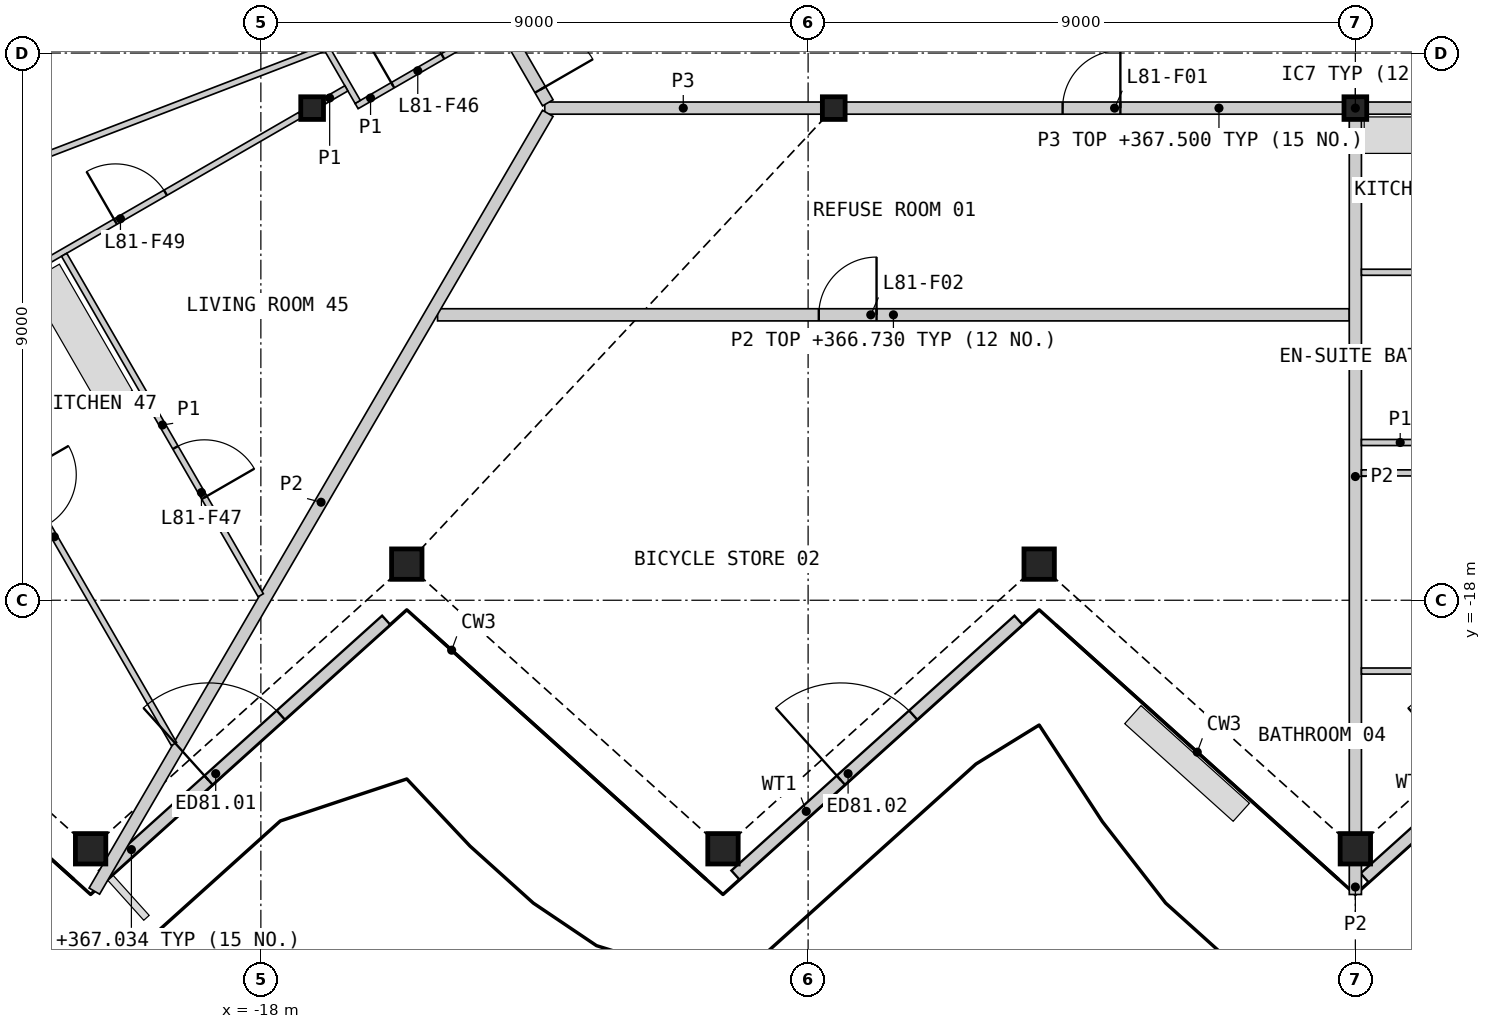
"""IFC4 building model, lengths in metres.
Left out: names, types, materials, properties, quantities, classifications, styles, units other than length and angle.
Written with IfcOpenShell. Run it as: python <this file> out.ifc"""

import sys

from ifc_helpers import new_model, si_unit, direction, frame, frame_2d, origin, origin_2d, place, context, subcontext, project, spatial, rectangle, hollow_rectangle, i_section, extrude, element, fill, save


model = new_model("IFC4")
c1 = context("Model", 3, precision=1e-05, world=origin(), true_north=direction((0.0, 1.0)))
c2 = subcontext(c1, "Body", "Model", "MODEL_VIEW")
j1 = project(units=[si_unit("LENGTHUNIT", "METRE"), si_unit("PLANEANGLEUNIT", "RADIAN")], contexts=[c1])
p1 = place(None, origin())
s1 = spatial("IfcSite", under=j1, at=p1, CompositionType="ELEMENT")
p2 = place(p1, origin())
s2 = spatial("IfcBuilding", under=s1, at=p2, CompositionType="ELEMENT")
p3 = place(p2, frame((0.0, 0.0, 364.4)))
s3 = spatial("IfcBuildingStorey", under=s2, at=p3, CompositionType="ELEMENT", Elevation=364.4)
for number, where, z_axis, x_axis in (
    (1, (-20.8, -22.088, 0.0), (0.0, 0.0, 1.0), (1.0, 0.0, 0.0)),
    (2, (-15.6, -17.406, 0.0), (0.0, 0.0, 1.0), (1.0, 0.0, 0.0)),
    (3, (-10.4, -22.088, 0.0), (0.0, 0.0, 1.0), (1.0, 0.0, 0.0)),
    (4, (-5.2, -17.406, 0.0), (0.0, 0.0, 1.0), (1.0, 0.0, 0.0)),
    (5, (0.0, -22.088, 0.0), (0.0, 0.0, 1.0), (1.0, 0.0, 0.0)),
):
    element("IfcColumn", number, at=place(p3, frame(where, z_axis=z_axis, x_axis=x_axis)), inside=s3, PredefinedType="COLUMN", context=c2, shape_type="SweptSolid", body=[
        extrude(hollow_rectangle(XDim=0.5, YDim=0.5, WallThickness=0.03, at=origin_2d()), origin(), (0.0, 0.0, 1.0), 3.4),
    ])
for number, where, z_axis, x_axis in (
    (6, (-17.157, -9.906, 0.0), (0.0, 0.0, 1.0), (1.0, 0.0, 0.0)),
    (7, (-8.578, -9.906, 0.0), (0.0, 0.0, 1.0), (1.0, 0.0, 0.0)),
    (8, (0.0, -9.906, 0.0), (0.0, 0.0, 1.0), (1.0, 0.0, 0.0)),
):
    element("IfcColumn", number, at=place(p3, frame(where, z_axis=z_axis, x_axis=x_axis)), inside=s3, PredefinedType="COLUMN", context=c2, shape_type="SweptSolid", body=[
        extrude(i_section(OverallWidth=0.374, OverallDepth=0.372, WebThickness=0.016, FlangeThickness=0.026, at=origin_2d()), origin(), (0.0, 0.0, 1.0), 3.4),
    ])
p4 = place(p3, frame((-20.595, -22.52, 0.0), z_axis=(0.0, 0.0, 1.0), x_axis=(0.743137181878, 0.669139095339, 0.0)))
e9 = element("IfcWall", 9, at=p4, inside=s3, PredefinedType="SOLIDWALL", context=c2, shape_type="SweptSolid", body=[
    extrude(rectangle(XDim=6.265, YDim=0.2, at=frame_2d((3.133, 0.0))), origin(), (0.0, 0.0, 1.0), 2.634),
])
p5 = place(p4, frame((2.333, 0.0, 0.0)))
e10 = element("IfcOpeningElement", 10, at=p5, cuts=e9, PredefinedType="OPENING", context=c2, shape_type="SweptSolid", body=[
    extrude(rectangle(XDim=1.6, YDim=2.25, at=frame_2d((0.8, 1.125))), frame((0.0, 0.11, 0.0), z_axis=(0.0, -1.0, 0.0), x_axis=(1.0, 0.0, 0.0)), (0.0, 0.0, 1.0), 0.22),
])
p6 = place(p3, frame((-10.195, -22.52, 0.0), z_axis=(0.0, 0.0, 1.0), x_axis=(0.743137181878, 0.669139095339, 0.0)))
e11 = element("IfcWall", 11, at=p6, inside=s3, PredefinedType="SOLIDWALL", context=c2, shape_type="SweptSolid", body=[
    extrude(rectangle(XDim=6.265, YDim=0.2, at=frame_2d((3.133, 0.0))), origin(), (0.0, 0.0, 1.0), 2.634),
])
p7 = place(p6, frame((2.333, 0.0, 0.0)))
e12 = element("IfcOpeningElement", 12, at=p7, cuts=e11, PredefinedType="OPENING", context=c2, shape_type="SweptSolid", body=[
    extrude(rectangle(XDim=1.6, YDim=2.25, at=frame_2d((0.8, 1.125))), frame((0.0, 0.11, 0.0), z_axis=(0.0, -1.0, 0.0), x_axis=(1.0, 0.0, 0.0)), (0.0, 0.0, 1.0), 0.22),
])
p8 = place(p3, frame((0.154, -22.567, 0.0), z_axis=(0.0, 0.0, 1.0), x_axis=(0.743150529995, 0.669124270796, 0.0)))
e13 = element("IfcWall", 13, at=p8, inside=s3, PredefinedType="SOLIDWALL", context=c2, shape_type="SweptSolid", body=[
    extrude(rectangle(XDim=6.678, YDim=0.2, at=frame_2d((3.339, 0.0))), origin(), (0.0, 0.0, 1.0), 2.634),
])
p9 = place(p8, frame((2.402, 0.0, 0.0)))
e14 = element("IfcOpeningElement", 14, at=p9, cuts=e13, PredefinedType="OPENING", context=c2, shape_type="SweptSolid", body=[
    extrude(rectangle(XDim=1.6, YDim=2.25, at=frame_2d((0.8, 1.125))), frame((0.0, 0.11, 0.0), z_axis=(0.0, -1.0, 0.0), x_axis=(1.0, 0.0, 0.0)), (0.0, 0.0, 1.0), 0.22),
])
p10 = place(p3, frame((-8.382, -9.906, 0.0), z_axis=(0.0, 0.0, 1.0), x_axis=(1.0, 0.0, 0.0)))
e15 = element("IfcWall", 15, at=p10, inside=s3, PredefinedType="PARTITIONING", context=c2, shape_type="SweptSolid", body=[
    extrude(rectangle(XDim=8.185, YDim=0.2, at=frame_2d((4.092, 0.0))), origin(), (0.0, 0.0, 1.0), 3.1),
])
p11 = place(p10, frame((3.567, 0.0, 0.0)))
e16 = element("IfcOpeningElement", 16, at=p11, cuts=e15, PredefinedType="OPENING", context=c2, shape_type="SweptSolid", body=[
    extrude(rectangle(XDim=0.95, YDim=2.1, at=frame_2d((0.475, 1.05))), frame((0.0, 0.11, 0.0), z_axis=(0.0, -1.0, 0.0), x_axis=(1.0, 0.0, 0.0)), (0.0, 0.0, 1.0), 0.22),
])
p12 = place(p3, frame((0.197, -9.906, 0.0), z_axis=(0.0, 0.0, 1.0), x_axis=(1.0, 0.0, 0.0)))
e17 = element("IfcWall", 17, at=p12, inside=s3, PredefinedType="PARTITIONING", context=c2, shape_type="SweptSolid", body=[
    extrude(rectangle(XDim=8.185, YDim=0.2, at=frame_2d((4.092, 0.0))), origin(), (0.0, 0.0, 1.0), 3.1),
])
p13 = place(p12, frame((3.39, 0.0, 0.0)))
e18 = element("IfcOpeningElement", 18, at=p13, cuts=e17, PredefinedType="OPENING", context=c2, shape_type="SweptSolid", body=[
    extrude(rectangle(XDim=1.0, YDim=2.1, at=frame_2d((0.5, 1.05))), frame((0.0, 0.11, 0.0), z_axis=(0.0, -1.0, 0.0), x_axis=(1.0, 0.0, 0.0)), (0.0, 0.0, 1.0), 0.22),
])
p14 = place(p3, frame((-13.331, -9.906, 0.0), z_axis=(0.0, 0.0, 1.0), x_axis=(1.0, 0.0, 0.0)))
e19 = element("IfcWall", 19, at=p14, inside=s3, PredefinedType="PARTITIONING", context=c2, shape_type="SweptSolid", body=[
    extrude(rectangle(XDim=4.555, YDim=0.2, at=frame_2d((2.278, 0.0))), origin(), (0.0, 0.0, 1.0), 3.1),
])
p15 = place(p3, frame((-15.131, -6.614, 0.0), z_axis=(0.0, 0.0, 1.0), x_axis=(0.499948957823, -0.866054870994, 0.0)))
e20 = element("IfcWall", 20, at=p15, inside=s3, PredefinedType="PARTITIONING", context=c2, shape_type="SweptSolid", body=[
    extrude(rectangle(XDim=3.701, YDim=0.2, at=frame_2d((1.851, 0.0))), origin(), (0.0, 0.0, 1.0), 3.1),
])
p16 = place(p15, frame((2.451, 0.0, 0.0)))
e21 = element("IfcOpeningElement", 21, at=p16, cuts=e20, PredefinedType="OPENING", context=c2, shape_type="SweptSolid", body=[
    extrude(rectangle(XDim=1.0, YDim=2.1, at=frame_2d((0.5, 1.05))), frame((0.0, 0.11, 0.0), z_axis=(0.0, -1.0, 0.0), x_axis=(1.0, 0.0, 0.0)), (0.0, 0.0, 1.0), 0.22),
])
p17 = place(p3, frame((-15.094, -13.306, 0.0), z_axis=(0.0, 0.0, 1.0), x_axis=(1.0, 0.0, 0.0)))
e22 = element("IfcWall", 22, at=p17, inside=s3, PredefinedType="PARTITIONING", context=c2, shape_type="SweptSolid", body=[
    extrude(rectangle(XDim=14.994, YDim=0.2, at=frame_2d((7.497, 0.0))), origin(), (0.0, 0.0, 1.0), 2.33),
])
p18 = place(p17, frame((6.27, 0.0, 0.0)))
e23 = element("IfcOpeningElement", 23, at=p18, cuts=e22, PredefinedType="OPENING", context=c2, shape_type="SweptSolid", body=[
    extrude(rectangle(XDim=0.95, YDim=2.1, at=frame_2d((0.475, 1.05))), frame((0.0, 0.11, 0.0), z_axis=(0.0, -1.0, 0.0), x_axis=(1.0, 0.0, 0.0)), (0.0, 0.0, 1.0), 0.22),
])
p19 = place(p3, frame((-20.739, -22.784, 0.0), z_axis=(0.0, 0.0, 1.0), x_axis=(0.50362599185, 0.863921790635, 0.0)))
e24 = element("IfcWall", 24, at=p19, inside=s3, PredefinedType="PARTITIONING", context=c2, shape_type="SweptSolid", body=[
    extrude(rectangle(XDim=14.807, YDim=0.2, at=frame_2d((7.404, 0.0))), origin(), (0.0, 0.0, 1.0), 2.33),
])
p20 = place(p3, frame((0.0, -21.828, 0.0), z_axis=(0.0, 0.0, 1.0), x_axis=(0.0, 1.0, 0.0)))
e25 = element("IfcWall", 25, at=p20, inside=s3, PredefinedType="PARTITIONING", context=c2, shape_type="SweptSolid", body=[
    extrude(rectangle(XDim=11.725, YDim=0.2, at=frame_2d((5.863, 0.0))), origin(), (0.0, 0.0, 1.0), 2.33),
])
p21 = place(p3, frame((0.0, -22.839, 0.0), z_axis=(0.0, 0.0, 1.0), x_axis=(0.0, 1.0, 0.0)))
e26 = element("IfcWall", 26, at=p21, inside=s3, PredefinedType="PARTITIONING", context=c2, shape_type="SweptSolid", body=[
    extrude(rectangle(XDim=0.491, YDim=0.2, at=frame_2d((0.246, 0.0))), origin(), (0.0, 0.0, 1.0), 2.33),
])
p22 = place(p3, frame((-28.725, -13.438, 0.0), z_axis=(0.0, 0.0, 1.0), x_axis=(0.933580312145, 0.358368247444, 0.0)))
e27 = element("IfcWall", 27, at=p22, inside=s3, PredefinedType="PARTITIONING", context=c2, shape_type="SweptSolid", body=[
    extrude(rectangle(XDim=12.59, YDim=0.1, at=frame_2d((6.295, 0.0))), origin(), (0.0, 0.0, 1.0), 2.33),
])
p23 = place(p22, frame((6.171, 0.0, 0.0)))
e28 = element("IfcOpeningElement", 28, at=p23, cuts=e27, PredefinedType="OPENING", context=c2, shape_type="SweptSolid", body=[
    extrude(rectangle(XDim=0.95, YDim=2.1, at=frame_2d((0.475, 1.05))), frame((0.0, 0.06, 0.0), z_axis=(0.0, -1.0, 0.0), x_axis=(1.0, 0.0, 0.0)), (0.0, 0.0, 1.0), 0.12),
])
p24 = place(p3, frame((-26.777, -15.46, 0.0), z_axis=(0.0, 0.0, 1.0), x_axis=(0.866019680922, 0.500009912158, 0.0)))
e29 = element("IfcWall", 29, at=p24, inside=s3, PredefinedType="PARTITIONING", context=c2, shape_type="SweptSolid", body=[
    extrude(rectangle(XDim=10.881, YDim=0.1, at=frame_2d((5.44, 0.0))), origin(), (0.0, 0.0, 1.0), 2.33),
])
p25 = place(p24, frame((7.373, 0.0, 0.0)))
e30 = element("IfcOpeningElement", 30, at=p25, cuts=e29, PredefinedType="OPENING", context=c2, shape_type="SweptSolid", body=[
    extrude(rectangle(XDim=0.95, YDim=2.1, at=frame_2d((0.475, 1.05))), frame((0.0, 0.06, 0.0), z_axis=(0.0, -1.0, 0.0), x_axis=(1.0, 0.0, 0.0)), (0.0, 0.0, 1.0), 0.12),
])
p26 = place(p3, frame((-23.365, -13.548, 0.0), z_axis=(0.0, 0.0, 1.0), x_axis=(0.500011483804, -0.866018773506, 0.0)))
e31 = element("IfcWall", 31, at=p26, inside=s3, PredefinedType="PARTITIONING", context=c2, shape_type="SweptSolid", body=[
    extrude(rectangle(XDim=7.872, YDim=0.1, at=frame_2d((3.936, 0.0))), origin(), (0.0, 0.0, 1.0), 2.33),
])
p27 = place(p26, frame((2.759, 0.0, 0.0)))
e32 = element("IfcOpeningElement", 32, at=p27, cuts=e31, PredefinedType="OPENING", context=c2, shape_type="SweptSolid", body=[
    extrude(rectangle(XDim=0.95, YDim=2.1, at=frame_2d((0.475, 1.05))), frame((0.0, 0.06, 0.0), z_axis=(0.0, -1.0, 0.0), x_axis=(1.0, 0.0, 0.0)), (0.0, 0.0, 1.0), 0.12),
])
p28 = place(p3, frame((-21.235, -12.318, 0.0), z_axis=(0.0, 0.0, 1.0), x_axis=(0.500008973052, -0.866020223129, 0.0)))
e33 = element("IfcWall", 33, at=p28, inside=s3, PredefinedType="PARTITIONING", context=c2, shape_type="SweptSolid", body=[
    extrude(rectangle(XDim=6.466, YDim=0.1, at=frame_2d((3.233, 0.0))), origin(), (0.0, 0.0, 1.0), 2.33),
])
p29 = place(p28, frame((3.661, 0.0, 0.0)))
e34 = element("IfcOpeningElement", 34, at=p29, cuts=e33, PredefinedType="OPENING", context=c2, shape_type="SweptSolid", body=[
    extrude(rectangle(XDim=0.95, YDim=2.1, at=frame_2d((0.475, 1.05))), frame((0.0, 0.06, 0.0), z_axis=(0.0, -1.0, 0.0), x_axis=(1.0, 0.0, 0.0)), (0.0, 0.0, 1.0), 0.12),
])
p30 = place(p3, frame((0.1, -19.164, 0.0), z_axis=(0.0, 0.0, 1.0), x_axis=(1.0, 0.0, 0.0)))
e35 = element("IfcWall", 35, at=p30, inside=s3, PredefinedType="PARTITIONING", context=c2, shape_type="SweptSolid", body=[
    extrude(rectangle(XDim=3.751, YDim=0.1, at=frame_2d((1.876, 0.0))), origin(), (0.0, 0.0, 1.0), 2.33),
])
p31 = place(p30, frame((2.579, 0.0, 0.0)))
e36 = element("IfcOpeningElement", 36, at=p31, cuts=e35, PredefinedType="OPENING", context=c2, shape_type="SweptSolid", body=[
    extrude(rectangle(XDim=0.95, YDim=2.1, at=frame_2d((0.475, 1.05))), frame((0.0, 0.06, 0.0), z_axis=(0.0, -1.0, 0.0), x_axis=(1.0, 0.0, 0.0)), (0.0, 0.0, 1.0), 0.12),
])
p32 = place(p3, frame((0.1, -15.906, 0.0), z_axis=(0.0, 0.0, 1.0), x_axis=(1.0, 0.0, 0.0)))
e37 = element("IfcWall", 37, at=p32, inside=s3, PredefinedType="PARTITIONING", context=c2, shape_type="SweptSolid", body=[
    extrude(rectangle(XDim=2.85, YDim=0.1, at=frame_2d((1.425, 0.0))), origin(), (0.0, 0.0, 1.0), 2.33),
])
p33 = place(p3, frame((0.1, -12.606, 0.0), z_axis=(0.0, 0.0, 1.0), x_axis=(1.0, 0.0, 0.0)))
e38 = element("IfcWall", 38, at=p33, inside=s3, PredefinedType="PARTITIONING", context=c2, shape_type="SweptSolid", body=[
    extrude(rectangle(XDim=2.55, YDim=0.1, at=frame_2d((1.275, 0.0))), origin(), (0.0, 0.0, 1.0), 2.33),
])
p34 = place(p3, frame((0.1, -15.406, 0.0), z_axis=(0.0, 0.0, 1.0), x_axis=(1.0, 0.0, 0.0)))
e39 = element("IfcWall", 39, at=p34, inside=s3, PredefinedType="PARTITIONING", context=c2, shape_type="SweptSolid", body=[
    extrude(rectangle(XDim=2.55, YDim=0.1, at=frame_2d((1.275, 0.0))), origin(), (0.0, 0.0, 1.0), 2.33),
])
p35 = place(p34, frame((1.35, 0.0, 0.0)))
e40 = element("IfcOpeningElement", 40, at=p35, cuts=e39, PredefinedType="OPENING", context=c2, shape_type="SweptSolid", body=[
    extrude(rectangle(XDim=0.95, YDim=2.1, at=frame_2d((0.475, 1.05))), frame((0.0, 0.06, 0.0), z_axis=(0.0, -1.0, 0.0), x_axis=(1.0, 0.0, 0.0)), (0.0, 0.0, 1.0), 0.12),
])
p36 = place(p3, frame((-16.426, -9.872, 0.0), z_axis=(0.0, 0.0, 1.0), x_axis=(0.866029095148, 0.499993606316, 0.0)))
e41 = element("IfcWall", 41, at=p36, inside=s3, PredefinedType="PARTITIONING", context=c2, shape_type="SweptSolid", body=[
    extrude(rectangle(XDim=2.65, YDim=0.1, at=frame_2d((1.325, 0.0))), origin(), (0.0, 0.0, 1.0), 2.33),
])
p37 = place(p36, frame((0.686, 0.0, 0.0)))
e42 = element("IfcOpeningElement", 42, at=p37, cuts=e41, PredefinedType="OPENING", context=c2, shape_type="SweptSolid", body=[
    extrude(rectangle(XDim=0.95, YDim=2.1, at=frame_2d((0.475, 1.05))), frame((0.0, 0.06, 0.0), z_axis=(0.0, -1.0, 0.0), x_axis=(1.0, 0.0, 0.0)), (0.0, 0.0, 1.0), 0.12),
])
p38 = place(p3, frame((-17.507, -7.899, 0.0), z_axis=(0.0, 0.0, 1.0), x_axis=(0.499946605688, -0.86605622881, 0.0)))
e43 = element("IfcWall", 43, at=p38, inside=s3, PredefinedType="PARTITIONING", context=c2, shape_type="SweptSolid", body=[
    extrude(rectangle(XDim=2.2, YDim=0.1, at=frame_2d((1.1, 0.0))), origin(), (0.0, 0.0, 1.0), 2.33),
])
p39 = place(p3, frame((-16.96, -9.792, 0.0), z_axis=(0.0, 0.0, 1.0), x_axis=(0.866137484628, 0.499805820016, 0.0)))
e44 = element("IfcWall", 44, at=p39, inside=s3, PredefinedType="PARTITIONING", context=c2, shape_type="SweptSolid", body=[
    extrude(rectangle(XDim=0.423, YDim=0.1, at=frame_2d((0.211, 0.0))), origin(), (0.0, 0.0, 1.0), 2.33),
])
p40 = place(p5, origin())
e45 = element("IfcDoor", 45, at=p40, inside=s3, OperationType="DOUBLE_DOOR_SINGLE_SWING", PredefinedType="DOOR", context=c2, shape_type="SweptSolid", body=[
    extrude(rectangle(XDim=1.6, YDim=2.25, at=frame_2d((0.8, 1.125))), frame((0.0, 0.025, 0.0), z_axis=(0.0, -1.0, 0.0), x_axis=(1.0, 0.0, 0.0)), (0.0, 0.0, 1.0), 0.05),
])
fill(e10, e45)
p41 = place(p7, origin())
e46 = element("IfcDoor", 46, at=p41, inside=s3, OperationType="DOUBLE_DOOR_SINGLE_SWING", PredefinedType="DOOR", context=c2, shape_type="SweptSolid", body=[
    extrude(rectangle(XDim=1.6, YDim=2.25, at=frame_2d((0.8, 1.125))), frame((0.0, 0.025, 0.0), z_axis=(0.0, -1.0, 0.0), x_axis=(1.0, 0.0, 0.0)), (0.0, 0.0, 1.0), 0.05),
])
fill(e12, e46)
p42 = place(p11, origin())
e47 = element("IfcDoor", 47, at=p42, inside=s3, OperationType="SINGLE_SWING_RIGHT", PredefinedType="DOOR", context=c2, shape_type="SweptSolid", body=[
    extrude(rectangle(XDim=0.95, YDim=2.1, at=frame_2d((0.475, 1.05))), frame((0.0, 0.025, 0.0), z_axis=(0.0, -1.0, 0.0), x_axis=(1.0, 0.0, 0.0)), (0.0, 0.0, 1.0), 0.05),
])
fill(e16, e47)
p43 = place(p18, origin())
e48 = element("IfcDoor", 48, at=p43, inside=s3, OperationType="SINGLE_SWING_RIGHT", PredefinedType="DOOR", context=c2, shape_type="SweptSolid", body=[
    extrude(rectangle(XDim=0.95, YDim=2.1, at=frame_2d((0.475, 1.05))), frame((0.0, 0.025, 0.0), z_axis=(0.0, -1.0, 0.0), x_axis=(1.0, 0.0, 0.0)), (0.0, 0.0, 1.0), 0.05),
])
fill(e23, e48)
p44 = place(p16, origin())
e49 = element("IfcDoor", 49, at=p44, inside=s3, OperationType="SINGLE_SWING_RIGHT", PredefinedType="DOOR", context=c2, shape_type="SweptSolid", body=[
    extrude(rectangle(XDim=1.0, YDim=2.1, at=frame_2d((0.5, 1.05))), frame((0.0, 0.025, 0.0), z_axis=(0.0, -1.0, 0.0), x_axis=(1.0, 0.0, 0.0)), (0.0, 0.0, 1.0), 0.05),
])
fill(e21, e49)
p45 = place(p37, origin())
e50 = element("IfcDoor", 50, at=p45, inside=s3, OperationType="SINGLE_SWING_LEFT", PredefinedType="DOOR", context=c2, shape_type="SweptSolid", body=[
    extrude(rectangle(XDim=0.95, YDim=2.1, at=frame_2d((0.475, 1.05))), frame((0.0, 0.025, 0.0), z_axis=(0.0, -1.0, 0.0), x_axis=(1.0, 0.0, 0.0)), (0.0, 0.0, 1.0), 0.05),
])
fill(e42, e50)
p46 = place(p29, origin())
e51 = element("IfcDoor", 51, at=p46, inside=s3, OperationType="SINGLE_SWING_RIGHT", PredefinedType="DOOR", context=c2, shape_type="SweptSolid", body=[
    extrude(rectangle(XDim=0.95, YDim=2.1, at=frame_2d((0.475, 1.05))), frame((0.0, 0.025, 0.0), z_axis=(0.0, -1.0, 0.0), x_axis=(1.0, 0.0, 0.0)), (0.0, 0.0, 1.0), 0.05),
])
fill(e34, e51)
p47 = place(p25, origin())
e52 = element("IfcDoor", 52, at=p47, inside=s3, OperationType="SINGLE_SWING_LEFT", PredefinedType="DOOR", context=c2, shape_type="SweptSolid", body=[
    extrude(rectangle(XDim=0.95, YDim=2.1, at=frame_2d((0.475, 1.05))), frame((0.0, 0.025, 0.0), z_axis=(0.0, -1.0, 0.0), x_axis=(1.0, 0.0, 0.0)), (0.0, 0.0, 1.0), 0.05),
])
fill(e30, e52)
save(model, sys.argv[1])
